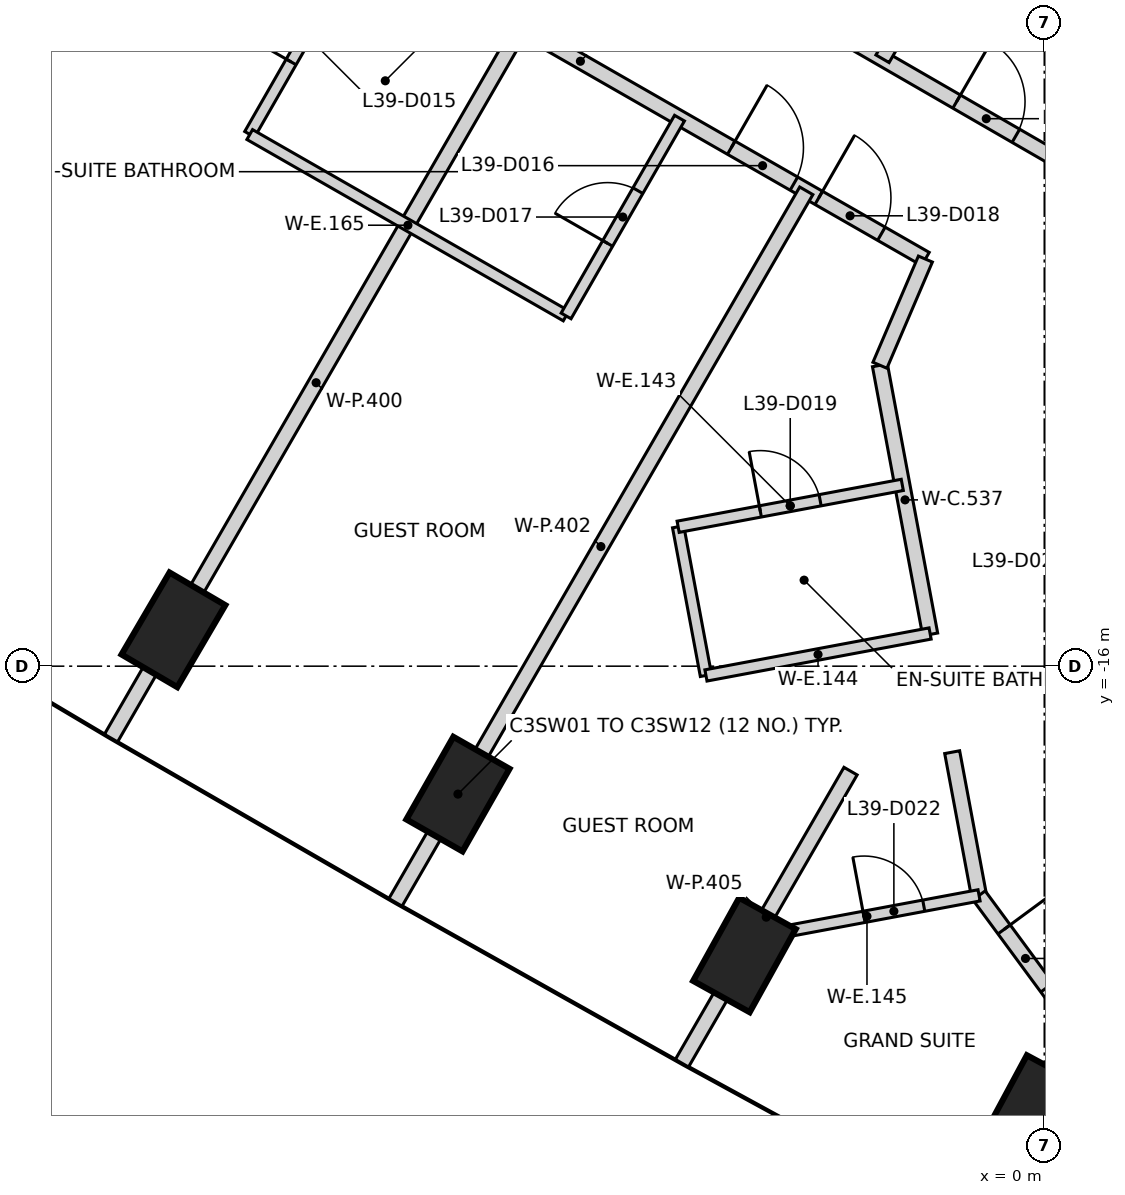
"""IFC4 building model, lengths in metres.
Left out: names, types, materials, properties, quantities, classifications, styles, units other than length and angle.
Written with IfcOpenShell. Run it as: python <this file> out.ifc"""

import sys

from ifc_helpers import new_model, si_unit, direction, frame, frame_2d, origin, origin_2d, place, context, subcontext, project, spatial, rectangle, extrude, element, fill, save


model = new_model("IFC4")
c1 = context("Model", 3, precision=1e-05, world=origin(), true_north=direction((0.0, 1.0)))
c2 = subcontext(c1, "Body", "Model", "MODEL_VIEW")
j1 = project(units=[si_unit("LENGTHUNIT", "METRE"), si_unit("PLANEANGLEUNIT", "RADIAN")], contexts=[c1])
p1 = place(None, origin())
s1 = spatial("IfcSite", under=j1, at=p1, CompositionType="ELEMENT")
p2 = place(p1, origin())
s2 = spatial("IfcBuilding", under=s1, at=p2, CompositionType="ELEMENT")
p3 = place(p2, frame((0.0, 0.0, 157.6)))
s3 = spatial("IfcBuildingStorey", under=s2, at=p3, CompositionType="ELEMENT", Elevation=157.6)
for number, where, z_axis, x_axis in (
    (1, (-11.457, -15.522, -0.4), (0.0, 0.0, 1.0), (0.505, 0.863, 0.0)),
    (2, (-7.714, -17.683, -0.4), (0.0, 0.0, 1.0), (0.495, 0.869, 0.0)),
    (3, (-3.945, -19.8, -0.4), (0.0, 0.0, 1.0), (0.485, 0.875, 0.0)),
    (4, (-0.151, -21.871, -0.4), (0.0, 0.0, 1.0), (0.474, 0.881, 0.0)),
):
    element("IfcColumn", number, at=place(p3, frame(where, z_axis=z_axis, x_axis=x_axis)), inside=s3, PredefinedType="COLUMN", context=c2, shape_type="SweptSolid", body=[
        extrude(rectangle(XDim=1.25, YDim=0.85, at=origin_2d()), origin(), (0.0, 0.0, 1.0), 3.6),
    ])
p4 = place(p3, frame((-10.642, -5.44, 0.0), z_axis=(0.0, 0.0, 1.0), x_axis=(0.867610688994, -0.497244097344, 0.0)))
e5 = element("IfcWall", 5, at=p4, inside=s3, PredefinedType="PARTITIONING", context=c2, shape_type="SweptSolid", body=[
    extrude(rectangle(XDim=10.464, YDim=0.2, at=frame_2d((5.232, 0.0))), origin(), (0.0, 0.0, 1.0), 3.2),
])
p5 = place(p4, frame((0.2, 0.0, 0.0)))
e6 = element("IfcOpeningElement", 6, at=p5, cuts=e5, PredefinedType="OPENING", context=c2, shape_type="SweptSolid", body=[
    extrude(rectangle(XDim=0.95, YDim=2.1, at=frame_2d((0.475, 1.05))), frame((0.0, 0.11, 0.0), z_axis=(0.0, -1.0, 0.0), x_axis=(1.0, 0.0, 0.0)), (0.0, 0.0, 1.0), 0.22),
])
p6 = place(p4, frame((7.519, 0.0, 0.0)))
e7 = element("IfcOpeningElement", 7, at=p6, cuts=e5, PredefinedType="OPENING", context=c2, shape_type="SweptSolid", body=[
    extrude(rectangle(XDim=0.95, YDim=2.1, at=frame_2d((0.475, 1.05))), frame((0.0, 0.11, 0.0), z_axis=(0.0, -1.0, 0.0), x_axis=(1.0, 0.0, 0.0)), (0.0, 0.0, 1.0), 0.22),
])
p7 = place(p4, frame((8.846, 0.0, 0.0)))
e8 = element("IfcOpeningElement", 8, at=p7, cuts=e5, PredefinedType="OPENING", context=c2, shape_type="SweptSolid", body=[
    extrude(rectangle(XDim=0.95, YDim=2.1, at=frame_2d((0.475, 1.05))), frame((0.0, 0.11, 0.0), z_axis=(0.0, -1.0, 0.0), x_axis=(1.0, 0.0, 0.0)), (0.0, 0.0, 1.0), 0.22),
])
p8 = place(p3, frame((-8.612, -4.265, 0.0), z_axis=(0.0, 0.0, 1.0), x_axis=(0.865984415152, -0.500070987675, 0.0)))
e9 = element("IfcWall", 9, at=p8, inside=s3, PredefinedType="PARTITIONING", context=c2, shape_type="SweptSolid", body=[
    extrude(rectangle(XDim=10.651, YDim=0.2, at=frame_2d((5.326, 0.0))), origin(), (0.0, 0.0, 1.0), 3.2),
])
p9 = place(p8, frame((1.138, 0.0, 0.0)))
e10 = element("IfcOpeningElement", 10, at=p9, cuts=e9, PredefinedType="OPENING", context=c2, shape_type="SweptSolid", body=[
    extrude(rectangle(XDim=0.9, YDim=2.1, at=frame_2d((0.45, 1.05))), frame((0.0, 0.11, 0.0), z_axis=(0.0, -1.0, 0.0), x_axis=(1.0, 0.0, 0.0)), (0.0, 0.0, 1.0), 0.22),
])
p10 = place(p8, frame((4.876, 0.0, 0.0)))
e11 = element("IfcOpeningElement", 11, at=p10, cuts=e9, PredefinedType="OPENING", context=c2, shape_type="SweptSolid", body=[
    extrude(rectangle(XDim=0.9, YDim=2.1, at=frame_2d((0.45, 1.05))), frame((0.0, 0.11, 0.0), z_axis=(0.0, -1.0, 0.0), x_axis=(1.0, 0.0, 0.0)), (0.0, 0.0, 1.0), 0.22),
])
p11 = place(p8, frame((8.613, 0.0, 0.0)))
e12 = element("IfcOpeningElement", 12, at=p11, cuts=e9, PredefinedType="OPENING", context=c2, shape_type="SweptSolid", body=[
    extrude(rectangle(XDim=0.9, YDim=2.1, at=frame_2d((0.45, 1.05))), frame((0.0, 0.11, 0.0), z_axis=(0.0, -1.0, 0.0), x_axis=(1.0, 0.0, 0.0)), (0.0, 0.0, 1.0), 0.22),
])
p12 = place(p3, frame((-2.162, -12.042, 0.0), z_axis=(0.0, 0.0, 1.0), x_axis=(0.183572226488, -0.983006224631, 0.0)))
e13 = element("IfcWall", 13, at=p12, inside=s3, PredefinedType="PARTITIONING", context=c2, shape_type="SweptSolid", body=[
    extrude(rectangle(XDim=3.602, YDim=0.2, at=frame_2d((1.801, 0.0))), origin(), (0.0, 0.0, 1.0), 3.2),
])
p13 = place(p3, frame((-2.162, -12.041, 0.0), z_axis=(0.0, 0.0, 1.0), x_axis=(0.393609042413, 0.919277934974, 0.0)))
e14 = element("IfcWall", 14, at=p13, inside=s3, PredefinedType="PARTITIONING", context=c2, shape_type="SweptSolid", body=[
    extrude(rectangle(XDim=1.52, YDim=0.2, at=frame_2d((0.76, 0.0))), origin(), (0.0, 0.0, 1.0), 3.2),
])
p14 = place(p3, frame((-1.212, -17.131, 0.0), z_axis=(0.0, 0.0, 1.0), x_axis=(0.183680924698, -0.982985919483, 0.0)))
e15 = element("IfcWall", 15, at=p14, inside=s3, PredefinedType="PARTITIONING", context=c2, shape_type="SweptSolid", body=[
    extrude(rectangle(XDim=1.917, YDim=0.2, at=frame_2d((0.958, 0.0))), origin(), (0.0, 0.0, 1.0), 3.2),
])
p15 = place(p3, frame((-0.858, -19.016, 0.0), z_axis=(0.0, 0.0, 1.0), x_axis=(0.593123867414, -0.805111220829, 0.0)))
e16 = element("IfcWall", 16, at=p15, inside=s3, PredefinedType="PARTITIONING", context=c2, shape_type="SweptSolid", body=[
    extrude(rectangle(XDim=2.77, YDim=0.2, at=frame_2d((1.385, 0.0))), origin(), (0.0, 0.0, 1.0), 3.2),
])
p16 = place(p15, frame((0.555, 0.0, 0.0)))
e17 = element("IfcOpeningElement", 17, at=p16, cuts=e16, PredefinedType="OPENING", context=c2, shape_type="SweptSolid", body=[
    extrude(rectangle(XDim=0.95, YDim=2.1, at=frame_2d((0.475, 1.05))), frame((0.0, 0.11, 0.0), z_axis=(0.0, -1.0, 0.0), x_axis=(1.0, 0.0, 0.0)), (0.0, 0.0, 1.0), 0.22),
])
p17 = place(p3, frame((-12.278, -16.946, 0.0), z_axis=(0.0, 0.0, 1.0), x_axis=(0.499882324153, 0.866093333307, 0.0)))
e18 = element("IfcWall", 18, at=p17, inside=s3, PredefinedType="PARTITIONING", context=c2, shape_type="SweptSolid", body=[
    extrude(rectangle(XDim=10.796, YDim=0.2, at=frame_2d((5.398, 0.0))), origin(), (0.0, 0.0, 1.0), 3.2),
])
p18 = place(p3, frame((-8.535, -19.107, 0.0), z_axis=(0.0, 0.0, 1.0), x_axis=(0.499987057201, 0.866032876184, 0.0)))
e19 = element("IfcWall", 19, at=p18, inside=s3, PredefinedType="PARTITIONING", context=c2, shape_type="SweptSolid", body=[
    extrude(rectangle(XDim=10.809, YDim=0.2, at=frame_2d((5.404, 0.0))), origin(), (0.0, 0.0, 1.0), 3.2),
])
p19 = place(p3, frame((-4.767, -21.223, 0.0), z_axis=(0.0, 0.0, 1.0), x_axis=(0.49992092869, 0.866071050814, 0.0)))
e20 = element("IfcWall", 20, at=p19, inside=s3, PredefinedType="PARTITIONING", context=c2, shape_type="SweptSolid", body=[
    extrude(rectangle(XDim=4.437, YDim=0.2, at=frame_2d((2.218, 0.0))), origin(), (0.0, 0.0, 1.0), 3.2),
])
p20 = place(p3, frame((-2.128, -8.009, 0.0), z_axis=(0.0, 0.0, 1.0), x_axis=(0.499986558861, 0.866033163891, 0.0)))
e21 = element("IfcWall", 21, at=p20, inside=s3, PredefinedType="PARTITIONING", context=c2, shape_type="SweptSolid", body=[
    extrude(rectangle(XDim=3.201, YDim=0.2, at=frame_2d((1.6, 0.0))), origin(), (0.0, 0.0, 1.0), 2.3),
])
p21 = place(p3, frame((-10.454, -9.003, 0.0), z_axis=(0.0, 0.0, 1.0), x_axis=(0.49740127306, 0.867520589703, 0.0)))
e22 = element("IfcWall", 22, at=p21, inside=s3, PredefinedType="PARTITIONING", context=c2, shape_type="SweptSolid", body=[
    extrude(rectangle(XDim=2.998, YDim=0.15, at=frame_2d((1.499, 0.0))), origin(), (0.0, 0.0, 1.0), 3.2),
])
p22 = place(p21, frame((1.098, 0.0, 0.0)))
e23 = element("IfcOpeningElement", 23, at=p22, cuts=e22, PredefinedType="OPENING", context=c2, shape_type="SweptSolid", body=[
    extrude(rectangle(XDim=0.8, YDim=2.1, at=frame_2d((0.4, 1.05))), frame((0.0, 0.085, 0.0), z_axis=(0.0, -1.0, 0.0), x_axis=(1.0, 0.0, 0.0)), (0.0, 0.0, 1.0), 0.17),
])
p23 = place(p3, frame((-10.453, -9.006, 0.0), z_axis=(0.0, 0.0, 1.0), x_axis=(0.86760039778, -0.49726205342, 0.0)))
e24 = element("IfcWall", 24, at=p23, inside=s3, PredefinedType="PARTITIONING", context=c2, shape_type="SweptSolid", body=[
    extrude(rectangle(XDim=4.797, YDim=0.15, at=frame_2d((2.399, 0.0))), origin(), (0.0, 0.0, 1.0), 3.2),
])
p24 = place(p3, frame((-6.291, -11.392, 0.0), z_axis=(0.0, 0.0, 1.0), x_axis=(0.497409432693, 0.867515911248, 0.0)))
e25 = element("IfcWall", 25, at=p24, inside=s3, PredefinedType="PARTITIONING", context=c2, shape_type="SweptSolid", body=[
    extrude(rectangle(XDim=3.0, YDim=0.15, at=frame_2d((1.5, 0.0))), origin(), (0.0, 0.0, 1.0), 3.2),
])
p25 = place(p24, frame((1.1, 0.0, 0.0)))
e26 = element("IfcOpeningElement", 26, at=p25, cuts=e25, PredefinedType="OPENING", context=c2, shape_type="SweptSolid", body=[
    extrude(rectangle(XDim=0.8, YDim=2.1, at=frame_2d((0.4, 1.05))), frame((0.0, 0.085, 0.0), z_axis=(0.0, -1.0, 0.0), x_axis=(1.0, 0.0, 0.0)), (0.0, 0.0, 1.0), 0.17),
])
p26 = place(p3, frame((-4.817, -14.166, 0.0), z_axis=(0.0, 0.0, 1.0), x_axis=(0.183903339385, -0.982944332993, 0.0)))
e27 = element("IfcWall", 27, at=p26, inside=s3, PredefinedType="PARTITIONING", context=c2, shape_type="SweptSolid", body=[
    extrude(rectangle(XDim=1.99, YDim=0.15, at=frame_2d((0.995, 0.0))), origin(), (0.0, 0.0, 1.0), 3.2),
])
p27 = place(p3, frame((-4.817, -14.166, 0.0), z_axis=(0.0, 0.0, 1.0), x_axis=(0.982987155193, 0.183674311555, 0.0)))
e28 = element("IfcWall", 28, at=p27, inside=s3, PredefinedType="PARTITIONING", context=c2, shape_type="SweptSolid", body=[
    extrude(rectangle(XDim=3.0, YDim=0.15, at=frame_2d((1.5, 0.0))), origin(), (0.0, 0.0, 1.0), 3.2),
])
p28 = place(p27, frame((1.1, 0.0, 0.0)))
e29 = element("IfcOpeningElement", 29, at=p28, cuts=e28, PredefinedType="OPENING", context=c2, shape_type="SweptSolid", body=[
    extrude(rectangle(XDim=0.8, YDim=2.1, at=frame_2d((0.4, 1.05))), frame((0.0, 0.085, 0.0), z_axis=(0.0, -1.0, 0.0), x_axis=(1.0, 0.0, 0.0)), (0.0, 0.0, 1.0), 0.17),
])
p29 = place(p3, frame((-4.451, -16.122, 0.0), z_axis=(0.0, 0.0, 1.0), x_axis=(0.982928336035, 0.18398882091, 0.0)))
e30 = element("IfcWall", 30, at=p29, inside=s3, PredefinedType="PARTITIONING", context=c2, shape_type="SweptSolid", body=[
    extrude(rectangle(XDim=3.0, YDim=0.15, at=frame_2d((1.5, 0.0))), origin(), (0.0, 0.0, 1.0), 3.2),
])
p30 = place(p3, frame((-3.807, -19.566, 0.0), z_axis=(0.0, 0.0, 1.0), x_axis=(0.982987155193, 0.183674311555, 0.0)))
e31 = element("IfcWall", 31, at=p30, inside=s3, PredefinedType="PARTITIONING", context=c2, shape_type="SweptSolid", body=[
    extrude(rectangle(XDim=3.0, YDim=0.15, at=frame_2d((1.5, 0.0))), origin(), (0.0, 0.0, 1.0), 3.2),
])
p31 = place(p30, frame((1.46, 0.0, 0.0)))
e32 = element("IfcOpeningElement", 32, at=p31, cuts=e31, PredefinedType="OPENING", context=c2, shape_type="SweptSolid", body=[
    extrude(rectangle(XDim=0.8, YDim=2.1, at=frame_2d((0.4, 1.05))), frame((0.0, 0.085, 0.0), z_axis=(0.0, -1.0, 0.0), x_axis=(1.0, 0.0, 0.0)), (0.0, 0.0, 1.0), 0.17),
])
p32 = place(p22, origin())
e33 = element("IfcDoor", 33, at=p32, inside=s3, OperationType="SINGLE_SWING_LEFT", PredefinedType="DOOR", context=c2, shape_type="SweptSolid", body=[
    extrude(rectangle(XDim=0.8, YDim=2.1, at=frame_2d((0.4, 1.05))), frame((0.0, 0.025, 0.0), z_axis=(0.0, -1.0, 0.0), x_axis=(1.0, 0.0, 0.0)), (0.0, 0.0, 1.0), 0.05),
])
fill(e23, e33)
p33 = place(p6, frame((0.95, 0.0, 0.0), z_axis=(0.0, 0.0, 1.0), x_axis=(-1.0, 0.0, 0.0)))
e34 = element("IfcDoor", 34, at=p33, inside=s3, OperationType="SINGLE_SWING_LEFT", PredefinedType="DOOR", context=c2, shape_type="SweptSolid", body=[
    extrude(rectangle(XDim=0.95, YDim=2.1, at=frame_2d((0.475, 1.05))), frame((0.0, 0.025, 0.0), z_axis=(0.0, -1.0, 0.0), x_axis=(1.0, 0.0, 0.0)), (0.0, 0.0, 1.0), 0.05),
])
fill(e7, e34)
p34 = place(p25, origin())
e35 = element("IfcDoor", 35, at=p34, inside=s3, OperationType="SINGLE_SWING_LEFT", PredefinedType="DOOR", context=c2, shape_type="SweptSolid", body=[
    extrude(rectangle(XDim=0.8, YDim=2.1, at=frame_2d((0.4, 1.05))), frame((0.0, 0.025, 0.0), z_axis=(0.0, -1.0, 0.0), x_axis=(1.0, 0.0, 0.0)), (0.0, 0.0, 1.0), 0.05),
])
fill(e26, e35)
p35 = place(p7, frame((0.95, 0.0, 0.0), z_axis=(0.0, 0.0, 1.0), x_axis=(-1.0, 0.0, 0.0)))
e36 = element("IfcDoor", 36, at=p35, inside=s3, OperationType="SINGLE_SWING_LEFT", PredefinedType="DOOR", context=c2, shape_type="SweptSolid", body=[
    extrude(rectangle(XDim=0.95, YDim=2.1, at=frame_2d((0.475, 1.05))), frame((0.0, 0.025, 0.0), z_axis=(0.0, -1.0, 0.0), x_axis=(1.0, 0.0, 0.0)), (0.0, 0.0, 1.0), 0.05),
])
fill(e8, e36)
p36 = place(p28, frame((0.8, 0.0, 0.0), z_axis=(0.0, 0.0, 1.0), x_axis=(-1.0, 0.0, 0.0)))
e37 = element("IfcDoor", 37, at=p36, inside=s3, OperationType="SINGLE_SWING_LEFT", PredefinedType="DOOR", context=c2, shape_type="SweptSolid", body=[
    extrude(rectangle(XDim=0.8, YDim=2.1, at=frame_2d((0.4, 1.05))), frame((0.0, 0.025, 0.0), z_axis=(0.0, -1.0, 0.0), x_axis=(1.0, 0.0, 0.0)), (0.0, 0.0, 1.0), 0.05),
])
fill(e29, e37)
p37 = place(p16, frame((0.95, 0.0, 0.0), z_axis=(0.0, 0.0, 1.0), x_axis=(-1.0, 0.0, 0.0)))
e38 = element("IfcDoor", 38, at=p37, inside=s3, OperationType="SINGLE_SWING_LEFT", PredefinedType="DOOR", context=c2, shape_type="SweptSolid", body=[
    extrude(rectangle(XDim=0.95, YDim=2.1, at=frame_2d((0.475, 1.05))), frame((0.0, 0.025, 0.0), z_axis=(0.0, -1.0, 0.0), x_axis=(1.0, 0.0, 0.0)), (0.0, 0.0, 1.0), 0.05),
])
fill(e17, e38)
p38 = place(p31, frame((0.8, 0.0, 0.0), z_axis=(0.0, 0.0, 1.0), x_axis=(-1.0, 0.0, 0.0)))
e39 = element("IfcDoor", 39, at=p38, inside=s3, OperationType="SINGLE_SWING_LEFT", PredefinedType="DOOR", context=c2, shape_type="SweptSolid", body=[
    extrude(rectangle(XDim=0.8, YDim=2.1, at=frame_2d((0.4, 1.05))), frame((0.0, 0.025, 0.0), z_axis=(0.0, -1.0, 0.0), x_axis=(1.0, 0.0, 0.0)), (0.0, 0.0, 1.0), 0.05),
])
fill(e32, e39)
p39 = place(p11, origin())
e40 = element("IfcDoor", 40, at=p39, inside=s3, OperationType="SINGLE_SWING_LEFT", PredefinedType="DOOR", context=c2, shape_type="SweptSolid", body=[
    extrude(rectangle(XDim=0.9, YDim=2.1, at=frame_2d((0.45, 1.05))), frame((0.0, 0.025, 0.0), z_axis=(0.0, -1.0, 0.0), x_axis=(1.0, 0.0, 0.0)), (0.0, 0.0, 1.0), 0.05),
])
fill(e12, e40)
save(model, sys.argv[1])
